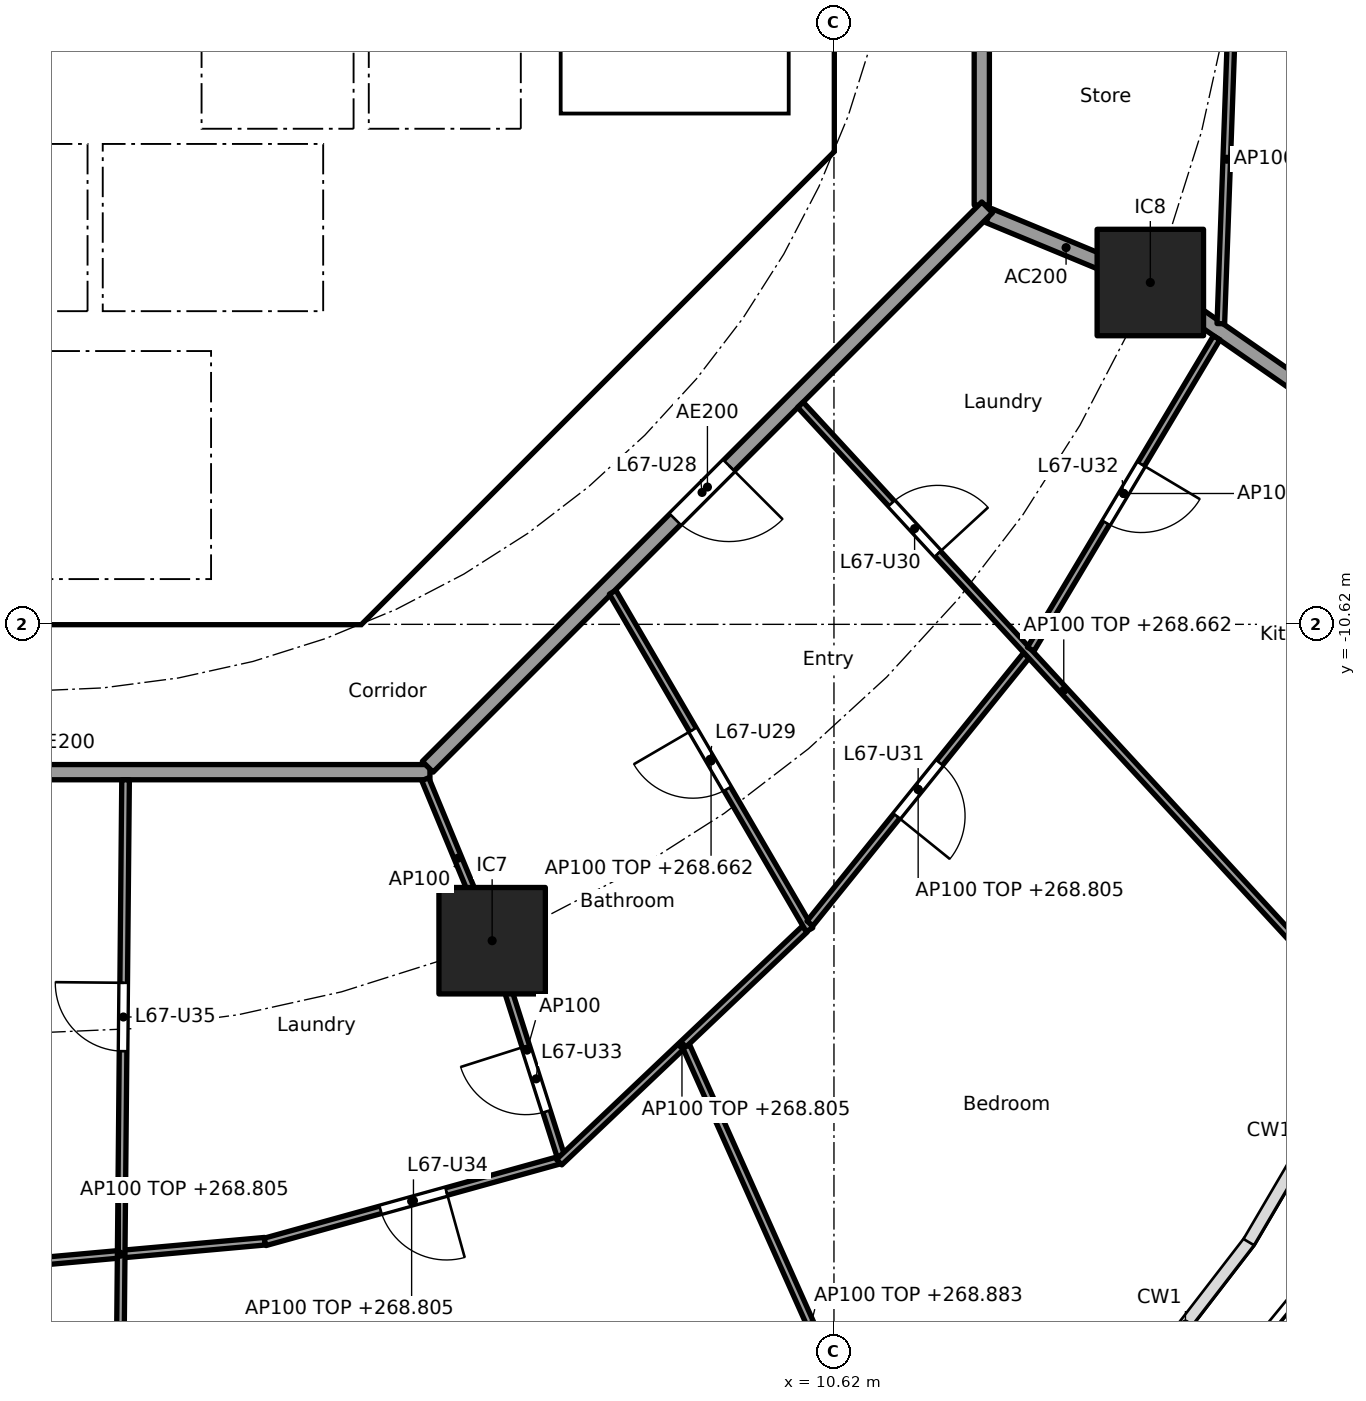
"""IFC4 building model, lengths in metres.
Left out: names, types, materials, properties, quantities, classifications, styles, units other than length and angle.
Written with IfcOpenShell. Run it as: python <this file> out.ifc"""

import sys

from ifc_helpers import new_model, si_unit, direction, frame, frame_2d, origin, origin_2d, place, context, subcontext, project, spatial, polyline, rectangle, outline, extrude, element, fill, save


model = new_model("IFC4")
c1 = context("Model", 3, precision=1e-05, world=origin(), true_north=direction((0.0, 1.0)))
c2 = subcontext(c1, "Body", "Model", "MODEL_VIEW")
j1 = project(units=[si_unit("LENGTHUNIT", "METRE"), si_unit("PLANEANGLEUNIT", "RADIAN")], contexts=[c1])
p1 = place(None, origin())
s1 = spatial("IfcSite", under=j1, at=p1, CompositionType="ELEMENT")
p2 = place(p1, origin())
s2 = spatial("IfcBuilding", under=s1, at=p2, CompositionType="ELEMENT")
p3 = place(p2, frame((0.0, 0.0, 265.9)))
s3 = spatial("IfcBuildingStorey", under=s2, at=p3, CompositionType="ELEMENT", Elevation=265.9)
for number, where, z_axis, x_axis in (
    (1, (6.123, -14.782, 0.0), (0.0, 0.0, 1.0), (1.0, 0.0, 0.0)),
    (2, (14.782, -6.123, 0.0), (0.0, 0.0, 1.0), (1.0, 0.0, 0.0)),
):
    element("IfcColumn", number, at=place(p3, frame(where, z_axis=z_axis, x_axis=x_axis)), inside=s3, PredefinedType="COLUMN", context=c2, shape_type="SweptSolid", body=[
        extrude(rectangle(XDim=1.4, YDim=1.4, at=origin_2d()), origin(), (0.0, 0.0, 1.0), 3.7),
    ])
p4 = place(p3, frame((4.613, -9.988, 0.0), z_axis=(0.0, 0.0, 1.0), x_axis=(0.707106781187, 0.707106781187, 0.0)))
e3 = element("IfcWall", 3, at=p4, inside=s3, PredefinedType="SHEAR", context=c2, shape_type="SweptSolid", body=[
    extrude(rectangle(XDim=7.602, YDim=0.6, at=frame_2d((3.801, 0.0))), origin(), (0.0, 0.0, 1.0), 3.44),
])
p5 = place(p4, frame((3.201, 0.0, 0.0)))
e4 = element("IfcOpeningElement", 4, at=p5, cuts=e3, PredefinedType="OPENING", context=c2, shape_type="SweptSolid", body=[
    extrude(rectangle(XDim=1.2, YDim=2.1, at=frame_2d((0.6, 1.05))), frame((0.0, 0.31, 0.0), z_axis=(0.0, -1.0, 0.0), x_axis=(1.0, 0.0, 0.0)), (0.0, 0.0, 1.0), 0.62),
])
p6 = place(p3, frame((4.0, -10.025, 0.0), z_axis=(0.0, 0.0, 1.0), x_axis=(0.0, 1.0, 0.0)))
e5 = element("IfcWall", 5, at=p6, inside=s3, PredefinedType="SOLIDWALL", context=c2, shape_type="SweptSolid", body=[
    extrude(rectangle(XDim=3.0, YDim=0.2, at=frame_2d((1.5, 0.0))), origin(), (0.0, 0.0, 1.0), 3.44),
])
p7 = place(p6, frame((0.975, 0.0, 0.0)))
e6 = element("IfcOpeningElement", 6, at=p7, cuts=e5, PredefinedType="OPENING", context=c2, shape_type="SweptSolid", body=[
    extrude(rectangle(XDim=1.1, YDim=2.1, at=frame_2d((0.55, 1.05))), frame((0.0, 0.11, 0.0), z_axis=(0.0, -1.0, 0.0), x_axis=(1.0, 0.0, 0.0)), (0.0, 0.0, 1.0), 0.22),
])
p8 = place(p3, frame((4.0, -6.5, 0.0), z_axis=(0.0, 0.0, 1.0), x_axis=(0.0, 1.0, 0.0)))
e7 = element("IfcWall", 7, at=p8, inside=s3, PredefinedType="SOLIDWALL", context=c2, shape_type="SweptSolid", body=[
    extrude(rectangle(XDim=2.2, YDim=0.2, at=frame_2d((1.1, 0.0))), origin(), (0.0, 0.0, 1.0), 3.44),
])
p9 = place(p8, frame((0.55, 0.0, 0.0)))
e8 = element("IfcOpeningElement", 8, at=p9, cuts=e7, PredefinedType="OPENING", context=c2, shape_type="SweptSolid", body=[
    extrude(rectangle(XDim=1.1, YDim=2.1, at=frame_2d((0.55, 1.05))), frame((0.0, 0.11, 0.0), z_axis=(0.0, -1.0, 0.0), x_axis=(1.0, 0.0, 0.0)), (0.0, 0.0, 1.0), 0.22),
])
p10 = place(p3, origin())
e9 = element("IfcWall", 9, at=p10, inside=s3, PredefinedType="SHEAR", context=c2, shape_type="SweptSolid", body=[
    extrude(outline(polyline([(-4.152, -10.025), (4.152, -10.025), (4.401, -9.776), (4.825, -10.2), (4.401, -10.625), (-4.401, -10.625), (-4.825, -10.2), (-4.401, -9.776), (-4.152, -10.025)])), origin(), (0.0, 0.0, 1.0), 3.44),
])
p11 = place(p3, origin())
e10 = element("IfcWall", 10, at=p11, inside=s3, PredefinedType="SHEAR", context=c2, shape_type="SweptSolid", body=[
    extrude(outline(polyline([(9.776, -4.401), (10.025, -4.152), (10.025, -3.801), (10.025, 4.152), (9.776, 4.401), (10.2, 4.825), (10.625, 4.401), (10.625, -4.401), (10.2, -4.825), (9.776, -4.401)])), origin(), (0.0, 0.0, 1.0), 3.44),
])
p12 = place(p3, frame((0.9, -6.5, 0.0), z_axis=(0.0, 0.0, 1.0), x_axis=(0.0, 1.0, 0.0)))
e11 = element("IfcWall", 11, at=p12, inside=s3, PredefinedType="SOLIDWALL", context=c2, shape_type="SweptSolid", body=[
    extrude(rectangle(XDim=2.2, YDim=0.2, at=frame_2d((1.1, 0.0))), origin(), (0.0, 0.0, 1.0), 3.44),
])
p13 = place(p3, origin())
e12 = element("IfcWall", 12, at=p13, inside=s3, PredefinedType="SOLIDWALL", context=c2, shape_type="SweptSolid", body=[
    extrude(outline(polyline([(-6.7, -2.1), (-6.5, -2.1), (-6.5, -4.1), (-2.3, -4.1), (-2.3, -2.1), (-2.1, -2.1), (-2.1, -4.1), (2.1, -4.1), (2.1, -2.1), (2.3, -2.1), (2.3, -4.1), (4.3, -4.1), (4.3, -2.1), (4.5, -2.1), (4.5, -4.1), (6.5, -4.1), (6.5, -2.1), (6.7, -2.1), (6.7, -4.3), (-6.7, -4.3), (-6.7, -2.1)])), origin(), (0.0, 0.0, 1.0), 3.44),
])
p14 = place(p3, origin())
e13 = element("IfcWall", 13, at=p14, inside=s3, PredefinedType="SOLIDWALL", context=c2, shape_type="SweptSolid", body=[
    extrude(outline(polyline([(4.1, -7.025), (-4.1, -7.025), (-4.1, -6.5), (4.1, -6.5), (4.1, -7.025)])), origin(), (0.0, 0.0, 1.0), 3.44),
])
p15 = place(p3, origin())
e14 = element("IfcWall", 14, at=p15, inside=s3, PredefinedType="SOLIDWALL", context=c2, shape_type="SweptSolid", body=[
    extrude(outline(polyline([(7.025, -3.9), (6.7, -3.9), (6.7, 3.9), (7.025, 3.9), (7.025, -3.9)])), origin(), (0.0, 0.0, 1.0), 3.44),
])
p16 = place(p3, origin())
e15 = element("IfcWall", 15, at=p16, inside=s3, PredefinedType="SOLIDWALL", context=c2, shape_type="SweptSolid", body=[
    extrude(outline(polyline([(10.025, -4.1), (6.7, -4.1), (6.7, -3.9), (10.025, -3.9), (10.025, -4.1)])), origin(), (0.0, 0.0, 1.0), 3.44),
])
p17 = place(p3, frame((12.657, -5.243, 0.0), z_axis=(0.0, 0.0, 1.0), x_axis=(0.92383017907, -0.382802560388, 0.0)))
e16 = element("IfcWall", 16, at=p17, inside=s3, PredefinedType="PARTITIONING", context=c2, shape_type="SweptSolid", body=[
    extrude(rectangle(XDim=2.2, YDim=0.2, at=frame_2d((1.1, 0.0))), origin(), (0.0, 0.0, 1.0), 3.44),
])
p18 = place(p3, frame((14.823, -6.151, 0.0), z_axis=(0.0, 0.0, 1.0), x_axis=(0.821435065081, -0.570302054928, 0.0)))
e17 = element("IfcWall", 17, at=p18, inside=s3, PredefinedType="PARTITIONING", context=c2, shape_type="SweptSolid", body=[
    extrude(rectangle(XDim=5.368, YDim=0.2, at=frame_2d((2.684, 0.0))), origin(), (0.0, 0.0, 1.0), 3.44),
])
p19 = place(p3, frame((12.565, -5.104, 0.0), z_axis=(0.0, 0.0, 1.0), x_axis=(0.0, 1.0, 0.0)))
e18 = element("IfcWall", 18, at=p19, inside=s3, PredefinedType="PARTITIONING", context=c2, shape_type="SweptSolid", body=[
    extrude(rectangle(XDim=10.209, YDim=0.2, at=frame_2d((5.104, 0.0))), origin(), (0.0, 0.0, 1.0), 3.44),
])
p20 = place(p19, frame((4.604, 0.0, 0.0)))
e19 = element("IfcOpeningElement", 19, at=p20, cuts=e18, PredefinedType="OPENING", context=c2, shape_type="SweptSolid", body=[
    extrude(rectangle(XDim=1.0, YDim=2.1, at=frame_2d((0.5, 1.05))), frame((0.0, 0.11, 0.0), z_axis=(0.0, -1.0, 0.0), x_axis=(1.0, 0.0, 0.0)), (0.0, 0.0, 1.0), 0.22),
])
p21 = place(p3, frame((-5.104, -12.565, 0.0), z_axis=(0.0, 0.0, 1.0), x_axis=(1.0, 0.0, 0.0)))
e20 = element("IfcWall", 20, at=p21, inside=s3, PredefinedType="PARTITIONING", context=c2, shape_type="SweptSolid", body=[
    extrude(rectangle(XDim=10.409, YDim=0.2, at=frame_2d((5.205, 0.0))), origin(), (0.0, 0.0, 1.0), 3.44),
])
p22 = place(p3, frame((5.275, -12.494, 0.0), z_axis=(0.0, 0.0, 1.0), x_axis=(0.707106781187, 0.707106781187, 0.0)))
e21 = element("IfcWall", 21, at=p22, inside=s3, PredefinedType="PARTITIONING", context=c2, shape_type="SweptSolid", body=[
    extrude(rectangle(XDim=10.409, YDim=0.2, at=frame_2d((5.205, 0.0))), origin(), (0.0, 0.0, 1.0), 3.44),
])
p23 = place(p22, frame((4.604, 0.0, 0.0)))
e22 = element("IfcOpeningElement", 22, at=p23, cuts=e21, PredefinedType="OPENING", context=c2, shape_type="SweptSolid", body=[
    extrude(rectangle(XDim=1.0, YDim=2.1, at=frame_2d((0.5, 1.05))), frame((0.0, 0.11, 0.0), z_axis=(0.0, -1.0, 0.0), x_axis=(1.0, 0.0, 0.0)), (0.0, 0.0, 1.0), 0.22),
])
p24 = place(p3, frame((15.865, -2.338, 0.0), z_axis=(0.0, 0.0, 1.0), x_axis=(-0.035864509465, -0.999356661538, 0.0)))
e23 = element("IfcWall", 23, at=p24, inside=s3, PredefinedType="PARTITIONING", context=c2, shape_type="SweptSolid", body=[
    extrude(rectangle(XDim=4.329, YDim=0.1, at=frame_2d((2.165, 0.0))), origin(), (0.0, 0.0, 1.0), 2.905),
])
p25 = place(p3, frame((-0.67, -19.077, 0.0), z_axis=(0.0, 0.0, 1.0), x_axis=(0.995986472869, 0.089503887414, 0.0)))
e24 = element("IfcWall", 24, at=p25, inside=s3, PredefinedType="PARTITIONING", context=c2, shape_type="SweptSolid", body=[
    extrude(rectangle(XDim=3.819, YDim=0.1, at=frame_2d((1.909, 0.0))), origin(), (0.0, 0.0, 1.0), 2.905),
])
p26 = place(p3, frame((1.3, -12.665, 0.0), z_axis=(0.0, 0.0, 1.0), x_axis=(-0.009254890166, -0.999957172587, 0.0)))
e25 = element("IfcWall", 25, at=p26, inside=s3, PredefinedType="PARTITIONING", context=c2, shape_type="SweptSolid", body=[
    extrude(rectangle(XDim=15.933, YDim=0.1, at=frame_2d((7.967, 0.0))), origin(), (0.0, 0.0, 1.0), 2.762),
])
p27 = place(p26, frame((2.671, 0.0, 0.0)))
e26 = element("IfcOpeningElement", 26, at=p27, cuts=e25, PredefinedType="OPENING", context=c2, shape_type="SweptSolid", body=[
    extrude(rectangle(XDim=0.9, YDim=2.1, at=frame_2d((0.45, 1.05))), frame((0.0, 0.06, 0.0), z_axis=(0.0, -1.0, 0.0), x_axis=(1.0, 0.0, 0.0)), (0.0, 0.0, 1.0), 0.12),
])
p28 = place(p3, frame((3.135, -18.744, 0.0), z_axis=(0.0, 0.0, 1.0), x_axis=(0.963606111552, 0.267326133738, 0.0)))
e27 = element("IfcWall", 27, at=p28, inside=s3, PredefinedType="PARTITIONING", context=c2, shape_type="SweptSolid", body=[
    extrude(rectangle(XDim=4.003, YDim=0.1, at=frame_2d((2.001, 0.0))), origin(), (0.0, 0.0, 1.0), 2.905),
])
p29 = place(p28, frame((1.576, 0.0, 0.0)))
e28 = element("IfcOpeningElement", 28, at=p29, cuts=e27, PredefinedType="OPENING", context=c2, shape_type="SweptSolid", body=[
    extrude(rectangle(XDim=0.9, YDim=2.1, at=frame_2d((0.45, 1.05))), frame((0.0, 0.06, 0.0), z_axis=(0.0, -1.0, 0.0), x_axis=(1.0, 0.0, 0.0)), (0.0, 0.0, 1.0), 0.12),
])
p30 = place(p3, frame((5.243, -12.657, 0.0), z_axis=(0.0, 0.0, 1.0), x_axis=(0.382719158442, -0.923864733477, 0.0)))
e29 = element("IfcWall", 29, at=p30, inside=s3, PredefinedType="PARTITIONING", context=c2, shape_type="SweptSolid", body=[
    extrude(rectangle(XDim=2.25, YDim=0.1, at=frame_2d((1.125, 0.0))), origin(), (0.0, 0.0, 1.0), 3.44),
])
p31 = place(p3, frame((6.138, -14.83, 0.0), z_axis=(0.0, 0.0, 1.0), x_axis=(0.303665801704, -0.952778610631, 0.0)))
e30 = element("IfcWall", 30, at=p31, inside=s3, PredefinedType="PARTITIONING", context=c2, shape_type="SweptSolid", body=[
    extrude(rectangle(XDim=2.922, YDim=0.1, at=frame_2d((1.461, 0.0))), origin(), (0.0, 0.0, 1.0), 3.44),
])
p32 = place(p31, frame((1.407, 0.0, 0.0)))
e31 = element("IfcOpeningElement", 31, at=p32, cuts=e30, PredefinedType="OPENING", context=c2, shape_type="SweptSolid", body=[
    extrude(rectangle(XDim=0.9, YDim=2.1, at=frame_2d((0.45, 1.05))), frame((0.0, 0.06, 0.0), z_axis=(0.0, -1.0, 0.0), x_axis=(1.0, 0.0, 0.0)), (0.0, 0.0, 1.0), 0.12),
])
p33 = place(p3, frame((7.004, -17.695, 0.0), z_axis=(0.0, 0.0, 1.0), x_axis=(0.725438442765, 0.68828705186, 0.0)))
e32 = element("IfcWall", 32, at=p33, inside=s3, PredefinedType="PARTITIONING", context=c2, shape_type="SweptSolid", body=[
    extrude(rectangle(XDim=4.456, YDim=0.1, at=frame_2d((2.228, 0.0))), origin(), (0.0, 0.0, 1.0), 2.905),
])
p34 = place(p3, frame((8.677, -16.173, 0.0), z_axis=(0.0, 0.0, 1.0), x_axis=(0.408174671437, -0.912903849043, 0.0)))
e33 = element("IfcWall", 33, at=p34, inside=s3, PredefinedType="PARTITIONING", context=c2, shape_type="SweptSolid", body=[
    extrude(rectangle(XDim=8.028, YDim=0.1, at=frame_2d((4.014, 0.0))), origin(), (0.0, 0.0, 1.0), 2.983),
])
p35 = place(p3, frame((7.708, -10.198, 0.0), z_axis=(0.0, 0.0, 1.0), x_axis=(0.503838537732, -0.863797851292, 0.0)))
e34 = element("IfcWall", 34, at=p35, inside=s3, PredefinedType="PARTITIONING", context=c2, shape_type="SweptSolid", body=[
    extrude(rectangle(XDim=5.14, YDim=0.1, at=frame_2d((2.57, 0.0))), origin(), (0.0, 0.0, 1.0), 2.762),
])
p36 = place(p35, frame((2.095, 0.0, 0.0)))
e35 = element("IfcOpeningElement", 35, at=p36, cuts=e34, PredefinedType="OPENING", context=c2, shape_type="SweptSolid", body=[
    extrude(rectangle(XDim=0.9, YDim=2.1, at=frame_2d((0.45, 1.05))), frame((0.0, 0.06, 0.0), z_axis=(0.0, -1.0, 0.0), x_axis=(1.0, 0.0, 0.0)), (0.0, 0.0, 1.0), 0.12),
])
p37 = place(p3, frame((10.304, -14.555, 0.0), z_axis=(0.0, 0.0, 1.0), x_axis=(0.628170338674, 0.778075848237, 0.0)))
e36 = element("IfcWall", 36, at=p37, inside=s3, PredefinedType="PARTITIONING", context=c2, shape_type="SweptSolid", body=[
    extrude(rectangle(XDim=4.532, YDim=0.1, at=frame_2d((2.266, 0.0))), origin(), (0.0, 0.0, 1.0), 2.905),
])
p38 = place(p37, frame((1.816, 0.0, 0.0)))
e37 = element("IfcOpeningElement", 37, at=p38, cuts=e36, PredefinedType="OPENING", context=c2, shape_type="SweptSolid", body=[
    extrude(rectangle(XDim=0.9, YDim=2.1, at=frame_2d((0.45, 1.05))), frame((0.0, 0.06, 0.0), z_axis=(0.0, -1.0, 0.0), x_axis=(1.0, 0.0, 0.0)), (0.0, 0.0, 1.0), 0.12),
])
p39 = place(p3, frame((10.179, -7.731, 0.0), z_axis=(0.0, 0.0, 1.0), x_axis=(0.67775318564, -0.73528947997, 0.0)))
e38 = element("IfcWall", 38, at=p39, inside=s3, PredefinedType="PARTITIONING", context=c2, shape_type="SweptSolid", body=[
    extrude(rectangle(XDim=10.222, YDim=0.1, at=frame_2d((5.111, 0.0))), origin(), (0.0, 0.0, 1.0), 2.762),
])
p40 = place(p39, frame((1.766, 0.0, 0.0)))
e39 = element("IfcOpeningElement", 39, at=p40, cuts=e38, PredefinedType="OPENING", context=c2, shape_type="SweptSolid", body=[
    extrude(rectangle(XDim=0.9, YDim=2.1, at=frame_2d((0.45, 1.05))), frame((0.0, 0.06, 0.0), z_axis=(0.0, -1.0, 0.0), x_axis=(1.0, 0.0, 0.0)), (0.0, 0.0, 1.0), 0.12),
])
p41 = place(p3, frame((13.208, -10.947, 0.0), z_axis=(0.0, 0.0, 1.0), x_axis=(0.512726452516, 0.858552028063, 0.0)))
e40 = element("IfcWall", 40, at=p41, inside=s3, PredefinedType="PARTITIONING", context=c2, shape_type="SweptSolid", body=[
    extrude(rectangle(XDim=4.772, YDim=0.1, at=frame_2d((2.386, 0.0))), origin(), (0.0, 0.0, 1.0), 2.905),
])
p42 = place(p41, frame((1.936, 0.0, 0.0)))
e41 = element("IfcOpeningElement", 41, at=p42, cuts=e40, PredefinedType="OPENING", context=c2, shape_type="SweptSolid", body=[
    extrude(rectangle(XDim=0.9, YDim=2.1, at=frame_2d((0.45, 1.05))), frame((0.0, 0.06, 0.0), z_axis=(0.0, -1.0, 0.0), x_axis=(1.0, 0.0, 0.0)), (0.0, 0.0, 1.0), 0.12),
])
p43 = place(p9, origin())
e42 = element("IfcDoor", 42, at=p43, inside=s3, OperationType="DOUBLE_DOOR_SLIDING", PredefinedType="DOOR", context=c2, shape_type="SweptSolid", body=[
    extrude(rectangle(XDim=1.1, YDim=2.1, at=frame_2d((0.55, 1.05))), frame((0.0, 0.025, 0.0), z_axis=(0.0, -1.0, 0.0), x_axis=(1.0, 0.0, 0.0)), (0.0, 0.0, 1.0), 0.05),
])
fill(e8, e42)
p44 = place(p7, origin())
e43 = element("IfcDoor", 43, at=p44, inside=s3, OperationType="SINGLE_SWING_RIGHT", PredefinedType="DOOR", context=c2, shape_type="SweptSolid", body=[
    extrude(rectangle(XDim=1.1, YDim=2.1, at=frame_2d((0.55, 1.05))), frame((0.0, 0.025, 0.0), z_axis=(0.0, -1.0, 0.0), x_axis=(1.0, 0.0, 0.0)), (0.0, 0.0, 1.0), 0.05),
])
fill(e6, e43)
p45 = place(p5, origin())
e44 = element("IfcDoor", 44, at=p45, inside=s3, OperationType="SINGLE_SWING_RIGHT", PredefinedType="DOOR", context=c2, shape_type="SweptSolid", body=[
    extrude(rectangle(XDim=1.2, YDim=2.1, at=frame_2d((0.6, 1.05))), frame((0.0, 0.025, 0.0), z_axis=(0.0, -1.0, 0.0), x_axis=(1.0, 0.0, 0.0)), (0.0, 0.0, 1.0), 0.05),
])
fill(e4, e44)
p46 = place(p23, frame((1.0, 0.0, 0.0), x_axis=(-1.0, 0.0, 0.0)))
e45 = element("IfcDoor", 45, at=p46, inside=s3, OperationType="SINGLE_SWING_LEFT", PredefinedType="DOOR", context=c2, shape_type="SweptSolid", body=[
    extrude(rectangle(XDim=1.0, YDim=2.1, at=frame_2d((0.5, 1.05))), frame((0.0, 0.025, 0.0), z_axis=(0.0, -1.0, 0.0), x_axis=(1.0, 0.0, 0.0)), (0.0, 0.0, 1.0), 0.05),
])
fill(e22, e45)
p47 = place(p36, frame((0.9, 0.0, 0.0), x_axis=(-1.0, 0.0, 0.0)))
e46 = element("IfcDoor", 46, at=p47, inside=s3, OperationType="SINGLE_SWING_RIGHT", PredefinedType="DOOR", context=c2, shape_type="SweptSolid", body=[
    extrude(rectangle(XDim=0.9, YDim=2.1, at=frame_2d((0.45, 1.05))), frame((0.0, 0.025, 0.0), z_axis=(0.0, -1.0, 0.0), x_axis=(1.0, 0.0, 0.0)), (0.0, 0.0, 1.0), 0.05),
])
fill(e35, e46)
p48 = place(p40, origin())
e47 = element("IfcDoor", 47, at=p48, inside=s3, OperationType="SINGLE_SWING_RIGHT", PredefinedType="DOOR", context=c2, shape_type="SweptSolid", body=[
    extrude(rectangle(XDim=0.9, YDim=2.1, at=frame_2d((0.45, 1.05))), frame((0.0, 0.025, 0.0), z_axis=(0.0, -1.0, 0.0), x_axis=(1.0, 0.0, 0.0)), (0.0, 0.0, 1.0), 0.05),
])
fill(e39, e47)
p49 = place(p38, frame((0.9, 0.0, 0.0), x_axis=(-1.0, 0.0, 0.0)))
e48 = element("IfcDoor", 48, at=p49, inside=s3, OperationType="SINGLE_SWING_RIGHT", PredefinedType="DOOR", context=c2, shape_type="SweptSolid", body=[
    extrude(rectangle(XDim=0.9, YDim=2.1, at=frame_2d((0.45, 1.05))), frame((0.0, 0.025, 0.0), z_axis=(0.0, -1.0, 0.0), x_axis=(1.0, 0.0, 0.0)), (0.0, 0.0, 1.0), 0.05),
])
fill(e37, e48)
p50 = place(p42, frame((0.9, 0.0, 0.0), x_axis=(-1.0, 0.0, 0.0)))
e49 = element("IfcDoor", 49, at=p50, inside=s3, OperationType="SINGLE_SWING_LEFT", PredefinedType="DOOR", context=c2, shape_type="SweptSolid", body=[
    extrude(rectangle(XDim=0.9, YDim=2.1, at=frame_2d((0.45, 1.05))), frame((0.0, 0.025, 0.0), z_axis=(0.0, -1.0, 0.0), x_axis=(1.0, 0.0, 0.0)), (0.0, 0.0, 1.0), 0.05),
])
fill(e41, e49)
p51 = place(p32, frame((0.9, 0.0, 0.0), x_axis=(-1.0, 0.0, 0.0)))
e50 = element("IfcDoor", 50, at=p51, inside=s3, OperationType="SINGLE_SWING_RIGHT", PredefinedType="DOOR", context=c2, shape_type="SweptSolid", body=[
    extrude(rectangle(XDim=0.9, YDim=2.1, at=frame_2d((0.45, 1.05))), frame((0.0, 0.025, 0.0), z_axis=(0.0, -1.0, 0.0), x_axis=(1.0, 0.0, 0.0)), (0.0, 0.0, 1.0), 0.05),
])
fill(e31, e50)
p52 = place(p29, frame((0.9, 0.0, 0.0), x_axis=(-1.0, 0.0, 0.0)))
e51 = element("IfcDoor", 51, at=p52, inside=s3, OperationType="SINGLE_SWING_LEFT", PredefinedType="DOOR", context=c2, shape_type="SweptSolid", body=[
    extrude(rectangle(XDim=0.9, YDim=2.1, at=frame_2d((0.45, 1.05))), frame((0.0, 0.025, 0.0), z_axis=(0.0, -1.0, 0.0), x_axis=(1.0, 0.0, 0.0)), (0.0, 0.0, 1.0), 0.05),
])
fill(e28, e51)
p53 = place(p27, frame((0.9, 0.0, 0.0), x_axis=(-1.0, 0.0, 0.0)))
e52 = element("IfcDoor", 52, at=p53, inside=s3, OperationType="SINGLE_SWING_RIGHT", PredefinedType="DOOR", context=c2, shape_type="SweptSolid", body=[
    extrude(rectangle(XDim=0.9, YDim=2.1, at=frame_2d((0.45, 1.05))), frame((0.0, 0.025, 0.0), z_axis=(0.0, -1.0, 0.0), x_axis=(1.0, 0.0, 0.0)), (0.0, 0.0, 1.0), 0.05),
])
fill(e26, e52)
save(model, sys.argv[1])
